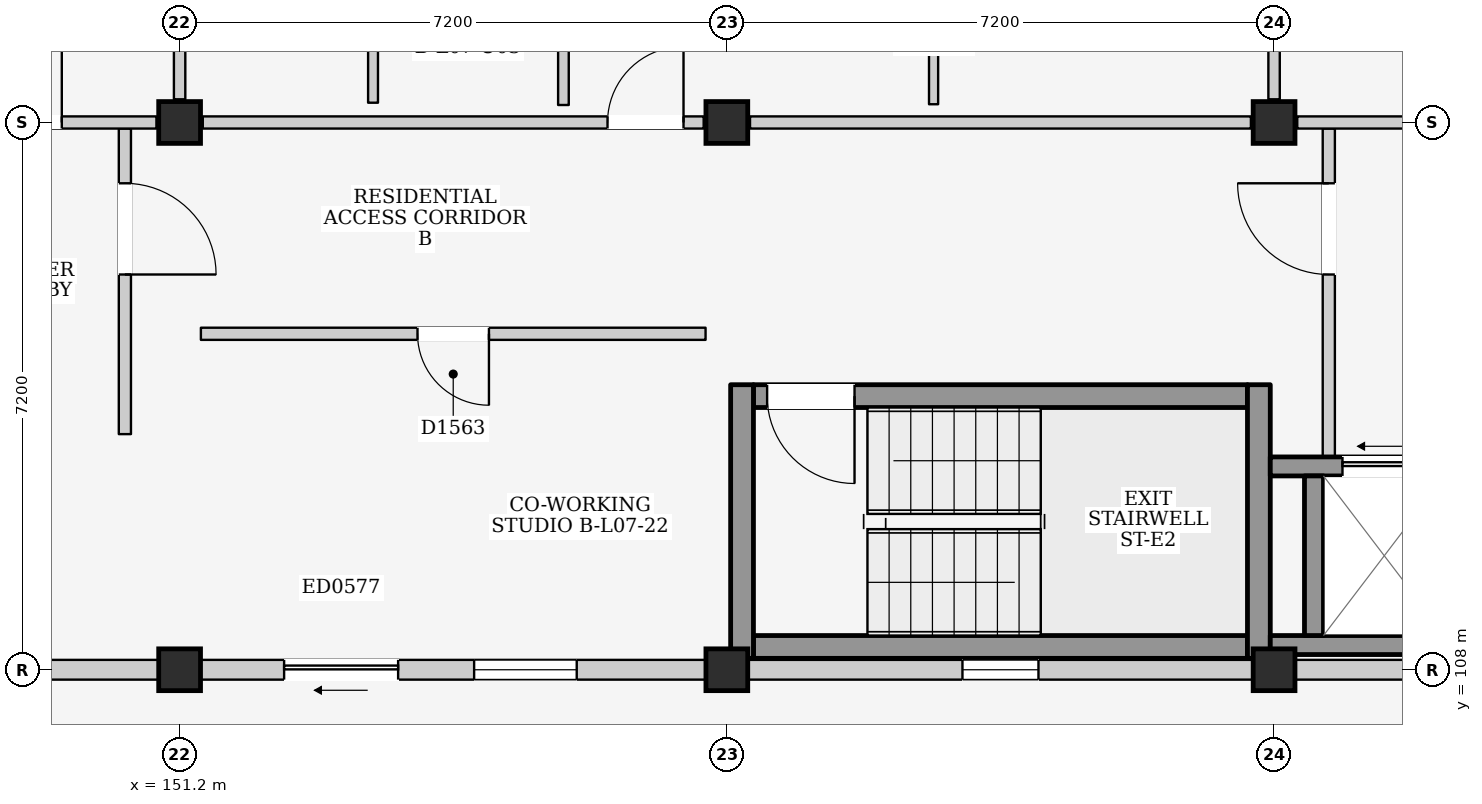
"""IFC4 building model, lengths in metres.
Left out: names, types, materials, properties, quantities, classifications, styles, units other than length and angle.
Written with IfcOpenShell. Run it as: python <this file> out.ifc"""

import sys

from ifc_helpers import new_model, si_unit, direction, frame, frame_2d, origin, origin_2d, place, context, subcontext, project, spatial, rectangle, extrude, element, fill, save


model = new_model("IFC4")
c1 = context("Model", 3, precision=1e-05, world=origin(), true_north=direction((0.0, 1.0)))
c2 = subcontext(c1, "Body", "Model", "MODEL_VIEW")
j1 = project(units=[si_unit("LENGTHUNIT", "METRE"), si_unit("PLANEANGLEUNIT", "RADIAN")], contexts=[c1])
p1 = place(None, origin())
s1 = spatial("IfcSite", under=j1, at=p1, CompositionType="ELEMENT")
p2 = place(p1, origin())
s2 = spatial("IfcBuilding", under=s1, at=p2, CompositionType="ELEMENT")
p3 = place(p2, frame((0.0, 0.0, 25.1)))
s3 = spatial("IfcBuildingStorey", under=s2, at=p3, CompositionType="ELEMENT", Elevation=25.1)
for number, where, z_axis, x_axis in (
    (1, (151.2, 108.0, 0.0), (0.0, 0.0, 1.0), (1.0, 0.0, 0.0)),
    (2, (151.2, 115.2, 0.0), (0.0, 0.0, 1.0), (1.0, 0.0, 0.0)),
    (3, (158.4, 108.0, 0.0), (0.0, 0.0, 1.0), (1.0, 0.0, 0.0)),
    (4, (158.4, 115.2, 0.0), (0.0, 0.0, 1.0), (1.0, 0.0, 0.0)),
    (5, (165.6, 108.0, 0.0), (0.0, 0.0, 1.0), (1.0, 0.0, 0.0)),
    (6, (165.6, 115.2, 0.0), (0.0, 0.0, 1.0), (1.0, 0.0, 0.0)),
):
    element("IfcColumn", number, at=place(p3, frame(where, z_axis=z_axis, x_axis=x_axis)), inside=s3, PredefinedType="COLUMN", context=c2, shape_type="SweptSolid", body=[
        extrude(rectangle(XDim=0.55, YDim=0.55, at=origin_2d()), origin(), (0.0, 0.0, 1.0), 3.2),
    ])
p4 = place(p3, frame((144.275, 108.0, 0.0), z_axis=(0.0, 0.0, 1.0), x_axis=(1.0, 0.0, 0.0)))
e7 = element("IfcWall", 7, at=p4, inside=s3, PredefinedType="ELEMENTEDWALL", context=c2, shape_type="SweptSolid", body=[
    extrude(rectangle(XDim=6.65, YDim=0.26, at=frame_2d((3.325, 0.0))), origin(), (0.0, 0.0, 1.0), 2.375),
])
p5 = place(p4, frame((2.825, 0.0, 1.2)))
e8 = element("IfcOpeningElement", 8, at=p5, cuts=e7, PredefinedType="OPENING", context=c2, shape_type="SweptSolid", body=[
    extrude(rectangle(XDim=1.0, YDim=0.9, at=frame_2d((0.5, 0.45))), frame((0.0, 0.145, 0.0), z_axis=(0.0, -1.0, 0.0), x_axis=(1.0, 0.0, 0.0)), (0.0, 0.0, 1.0), 0.29),
])
p6 = place(p3, frame((151.475, 108.0, 0.0), z_axis=(0.0, 0.0, 1.0), x_axis=(1.0, 0.0, 0.0)))
e9 = element("IfcWall", 9, at=p6, inside=s3, PredefinedType="ELEMENTEDWALL", context=c2, shape_type="SweptSolid", body=[
    extrude(rectangle(XDim=6.65, YDim=0.26, at=frame_2d((3.325, 0.0))), origin(), (0.0, 0.0, 1.0), 2.375),
])
p7 = place(p6, frame((1.1, 0.0, 0.0)))
e10 = element("IfcOpeningElement", 10, at=p7, cuts=e9, PredefinedType="OPENING", context=c2, shape_type="SweptSolid", body=[
    extrude(rectangle(XDim=1.5, YDim=2.12, at=frame_2d((0.75, 1.06))), frame((0.0, 0.145, 0.0), z_axis=(0.0, -1.0, 0.0), x_axis=(1.0, 0.0, 0.0)), (0.0, 0.0, 1.0), 0.29),
])
p8 = place(p6, frame((3.6, 0.0, 0.765)))
e11 = element("IfcOpeningElement", 11, at=p8, cuts=e9, PredefinedType="OPENING", context=c2, shape_type="SweptSolid", body=[
    extrude(rectangle(XDim=1.35, YDim=1.5, at=frame_2d((0.675, 0.75))), frame((0.0, 0.145, 0.0), z_axis=(0.0, -1.0, 0.0), x_axis=(1.0, 0.0, 0.0)), (0.0, 0.0, 1.0), 0.29),
])
p9 = place(p3, frame((158.675, 108.0, 0.0), z_axis=(0.0, 0.0, 1.0), x_axis=(1.0, 0.0, 0.0)))
e12 = element("IfcWall", 12, at=p9, inside=s3, PredefinedType="ELEMENTEDWALL", context=c2, shape_type="SweptSolid", body=[
    extrude(rectangle(XDim=6.65, YDim=0.26, at=frame_2d((3.325, 0.0))), origin(), (0.0, 0.0, 1.0), 2.375),
])
p10 = place(p9, frame((2.825, 0.0, 1.2)))
e13 = element("IfcOpeningElement", 13, at=p10, cuts=e12, PredefinedType="OPENING", context=c2, shape_type="SweptSolid", body=[
    extrude(rectangle(XDim=1.0, YDim=0.9, at=frame_2d((0.5, 0.45))), frame((0.0, 0.145, 0.0), z_axis=(0.0, -1.0, 0.0), x_axis=(1.0, 0.0, 0.0)), (0.0, 0.0, 1.0), 0.29),
])
p11 = place(p3, frame((165.875, 108.0, 0.0), z_axis=(0.0, 0.0, 1.0), x_axis=(1.0, 0.0, 0.0)))
e14 = element("IfcWall", 14, at=p11, inside=s3, PredefinedType="ELEMENTEDWALL", context=c2, shape_type="SweptSolid", body=[
    extrude(rectangle(XDim=6.65, YDim=0.26, at=frame_2d((3.325, 0.0))), origin(), (0.0, 0.0, 1.0), 2.375),
])
p12 = place(p11, frame((2.825, 0.0, 1.2)))
e15 = element("IfcOpeningElement", 15, at=p12, cuts=e14, PredefinedType="OPENING", context=c2, shape_type="SweptSolid", body=[
    extrude(rectangle(XDim=1.0, YDim=0.9, at=frame_2d((0.5, 0.45))), frame((0.0, 0.145, 0.0), z_axis=(0.0, -1.0, 0.0), x_axis=(1.0, 0.0, 0.0)), (0.0, 0.0, 1.0), 0.29),
])
p13 = place(p3, frame((150.48, 111.1, 0.0), z_axis=(0.0, 0.0, 1.0), x_axis=(0.0, 1.0, 0.0)))
e16 = element("IfcWall", 16, at=p13, inside=s3, PredefinedType="PARTITIONING", context=c2, shape_type="SweptSolid", body=[
    extrude(rectangle(XDim=4.02, YDim=0.16, at=frame_2d((2.01, 0.0))), origin(), (0.0, 0.0, 1.0), 2.99),
])
p14 = place(p13, frame((2.1, 0.0, 0.0)))
e17 = element("IfcOpeningElement", 17, at=p14, cuts=e16, PredefinedType="OPENING", context=c2, shape_type="SweptSolid", body=[
    extrude(rectangle(XDim=1.2, YDim=2.2, at=frame_2d((0.6, 1.1))), frame((0.0, 0.095, 0.0), z_axis=(0.0, -1.0, 0.0), x_axis=(1.0, 0.0, 0.0)), (0.0, 0.0, 1.0), 0.19),
])
p15 = place(p3, frame((158.75, 108.3, 0.0), z_axis=(0.0, 0.0, 1.0), x_axis=(1.0, 0.0, 0.0)))
e18 = element("IfcWall", 18, at=p15, inside=s3, PredefinedType="SHEAR", context=c2, shape_type="SweptSolid", body=[
    extrude(rectangle(XDim=6.5, YDim=0.3, at=frame_2d((3.25, 0.0))), origin(), (0.0, 0.0, 1.0), 2.99),
])
p16 = place(p3, frame((158.75, 111.6, 0.0), z_axis=(0.0, 0.0, 1.0), x_axis=(1.0, 0.0, 0.0)))
e19 = element("IfcWall", 19, at=p16, inside=s3, PredefinedType="SHEAR", context=c2, shape_type="SweptSolid", body=[
    extrude(rectangle(XDim=6.5, YDim=0.3, at=frame_2d((3.25, 0.0))), origin(), (0.0, 0.0, 1.0), 2.99),
])
p17 = place(p16, frame((0.18, 0.0, 0.0)))
e20 = element("IfcOpeningElement", 20, at=p17, cuts=e19, PredefinedType="OPENING", context=c2, shape_type="SweptSolid", body=[
    extrude(rectangle(XDim=1.15, YDim=2.2, at=frame_2d((0.575, 1.1))), frame((0.0, 0.165, 0.0), z_axis=(0.0, -1.0, 0.0), x_axis=(1.0, 0.0, 0.0)), (0.0, 0.0, 1.0), 0.33),
])
for number, where, z_axis, x_axis in (
    (21, (158.6, 108.15, 0.0), (0.0, 0.0, 1.0), (0.0, 1.0, 0.0)),
    (22, (165.4, 108.15, 0.0), (0.0, 0.0, 1.0), (0.0, 1.0, 0.0)),
):
    element("IfcWall", number, at=place(p3, frame(where, z_axis=z_axis, x_axis=x_axis)), inside=s3, PredefinedType="SHEAR", context=c2, shape_type="SweptSolid", body=[
        extrude(rectangle(XDim=3.6, YDim=0.3, at=frame_2d((1.8, 0.0))), origin(), (0.0, 0.0, 1.0), 2.99),
    ])
p18 = place(p3, frame((166.32, 110.8, 0.0), z_axis=(0.0, 0.0, 1.0), x_axis=(0.0, 1.0, 0.0)))
e23 = element("IfcWall", 23, at=p18, inside=s3, PredefinedType="PARTITIONING", context=c2, shape_type="SweptSolid", body=[
    extrude(rectangle(XDim=4.32, YDim=0.16, at=frame_2d((2.16, 0.0))), origin(), (0.0, 0.0, 1.0), 2.99),
])
p19 = place(p18, frame((2.4, 0.0, 0.0)))
e24 = element("IfcOpeningElement", 24, at=p19, cuts=e23, PredefinedType="OPENING", context=c2, shape_type="SweptSolid", body=[
    extrude(rectangle(XDim=1.2, YDim=2.2, at=frame_2d((0.6, 1.1))), frame((0.0, 0.095, 0.0), z_axis=(0.0, -1.0, 0.0), x_axis=(1.0, 0.0, 0.0)), (0.0, 0.0, 1.0), 0.19),
])
p20 = place(p3, frame((165.55, 108.325, 0.0), z_axis=(0.0, 0.0, 1.0), x_axis=(1.0, 0.0, 0.0)))
e25 = element("IfcWall", 25, at=p20, inside=s3, PredefinedType="SHEAR", context=c2, shape_type="SweptSolid", body=[
    extrude(rectangle(XDim=2.55, YDim=0.25, at=frame_2d((1.275, 0.0))), origin(), (0.0, 0.0, 1.0), 2.99),
])
p21 = place(p3, frame((165.55, 110.675, 0.0), z_axis=(0.0, 0.0, 1.0), x_axis=(1.0, 0.0, 0.0)))
e26 = element("IfcWall", 26, at=p21, inside=s3, PredefinedType="SHEAR", context=c2, shape_type="SweptSolid", body=[
    extrude(rectangle(XDim=2.55, YDim=0.25, at=frame_2d((1.275, 0.0))), origin(), (0.0, 0.0, 1.0), 2.99),
])
p22 = place(p21, frame((0.95, 0.0, 0.0)))
e27 = element("IfcOpeningElement", 27, at=p22, cuts=e26, PredefinedType="OPENING", context=c2, shape_type="SweptSolid", body=[
    extrude(rectangle(XDim=1.1, YDim=2.15, at=frame_2d((0.55, 1.075))), frame((0.0, 0.14, 0.0), z_axis=(0.0, -1.0, 0.0), x_axis=(1.0, 0.0, 0.0)), (0.0, 0.0, 1.0), 0.28),
])
p23 = place(p3, frame((166.125, 108.45, 0.0), z_axis=(0.0, 0.0, 1.0), x_axis=(0.0, 1.0, 0.0)))
e28 = element("IfcWall", 28, at=p23, inside=s3, PredefinedType="SHEAR", context=c2, shape_type="SweptSolid", body=[
    extrude(rectangle(XDim=2.1, YDim=0.25, at=frame_2d((1.05, 0.0))), origin(), (0.0, 0.0, 1.0), 2.99),
])
p24 = place(p3, frame((144.305, 115.2, 0.0), z_axis=(0.0, 0.0, 1.0), x_axis=(1.0, 0.0, 0.0)))
e29 = element("IfcWall", 29, at=p24, inside=s3, PredefinedType="PARTITIONING", context=c2, shape_type="SweptSolid", body=[
    extrude(rectangle(XDim=6.59, YDim=0.16, at=frame_2d((3.295, 0.0))), origin(), (0.0, 0.0, 1.0), 2.375),
])
p25 = place(p24, frame((4.345, 0.0, 0.0)))
e30 = element("IfcOpeningElement", 30, at=p25, cuts=e29, PredefinedType="OPENING", context=c2, shape_type="SweptSolid", body=[
    extrude(rectangle(XDim=1.0, YDim=2.15, at=frame_2d((0.5, 1.075))), frame((0.0, 0.095, 0.0), z_axis=(0.0, -1.0, 0.0), x_axis=(1.0, 0.0, 0.0)), (0.0, 0.0, 1.0), 0.19),
])
p26 = place(p3, frame((151.2, 115.505, 0.0), z_axis=(0.0, 0.0, 1.0), x_axis=(0.0, 1.0, 0.0)))
e31 = element("IfcWall", 31, at=p26, inside=s3, PredefinedType="PARTITIONING", context=c2, shape_type="SweptSolid", body=[
    extrude(rectangle(XDim=6.59, YDim=0.15, at=frame_2d((3.295, 0.0))), origin(), (0.0, 0.0, 1.0), 2.475),
])
p27 = place(p3, frame((151.505, 115.2, 0.0), z_axis=(0.0, 0.0, 1.0), x_axis=(1.0, 0.0, 0.0)))
e32 = element("IfcWall", 32, at=p27, inside=s3, PredefinedType="PARTITIONING", context=c2, shape_type="SweptSolid", body=[
    extrude(rectangle(XDim=6.59, YDim=0.16, at=frame_2d((3.295, 0.0))), origin(), (0.0, 0.0, 1.0), 2.375),
])
p28 = place(p27, frame((5.325, 0.0, 0.0)))
e33 = element("IfcOpeningElement", 33, at=p28, cuts=e32, PredefinedType="OPENING", context=c2, shape_type="SweptSolid", body=[
    extrude(rectangle(XDim=1.0, YDim=2.15, at=frame_2d((0.5, 1.075))), frame((0.0, 0.095, 0.0), z_axis=(0.0, -1.0, 0.0), x_axis=(1.0, 0.0, 0.0)), (0.0, 0.0, 1.0), 0.19),
])
p29 = place(p3, frame((158.705, 115.2, 0.0), z_axis=(0.0, 0.0, 1.0), x_axis=(1.0, 0.0, 0.0)))
e34 = element("IfcWall", 34, at=p29, inside=s3, PredefinedType="PARTITIONING", context=c2, shape_type="SweptSolid", body=[
    extrude(rectangle(XDim=6.59, YDim=0.16, at=frame_2d((3.295, 0.0))), origin(), (0.0, 0.0, 1.0), 2.375),
])
p30 = place(p3, frame((165.6, 115.505, 0.0), z_axis=(0.0, 0.0, 1.0), x_axis=(0.0, 1.0, 0.0)))
e35 = element("IfcWall", 35, at=p30, inside=s3, PredefinedType="PARTITIONING", context=c2, shape_type="SweptSolid", body=[
    extrude(rectangle(XDim=6.59, YDim=0.15, at=frame_2d((3.295, 0.0))), origin(), (0.0, 0.0, 1.0), 2.475),
])
p31 = place(p3, frame((153.745, 115.46, 0.0), z_axis=(0.0, 0.0, 1.0), x_axis=(0.0, 1.0, 0.0)))
e36 = element("IfcWall", 36, at=p31, inside=s3, PredefinedType="PARTITIONING", context=c2, shape_type="SweptSolid", body=[
    extrude(rectangle(XDim=3.04, YDim=0.13, at=frame_2d((1.52, 0.0))), origin(), (0.0, 0.0, 1.0), 2.99),
])
p32 = place(p3, frame((156.25, 115.43, 0.0), z_axis=(0.0, 0.0, 1.0), x_axis=(0.0, 1.0, 0.0)))
e37 = element("IfcWall", 37, at=p32, inside=s3, PredefinedType="PARTITIONING", context=c2, shape_type="SweptSolid", body=[
    extrude(rectangle(XDim=3.06, YDim=0.14, at=frame_2d((1.53, 0.0))), origin(), (0.0, 0.0, 1.0), 2.99),
])
p33 = place(p3, frame((161.12, 115.44, 0.0), z_axis=(0.0, 0.0, 1.0), x_axis=(0.0, 1.0, 0.0)))
e38 = element("IfcWall", 38, at=p33, inside=s3, PredefinedType="PARTITIONING", context=c2, shape_type="SweptSolid", body=[
    extrude(rectangle(XDim=3.04, YDim=0.12, at=frame_2d((1.52, 0.0))), origin(), (0.0, 0.0, 1.0), 2.99),
])
p34 = place(p33, frame((1.04, 0.0, 0.0)))
e39 = element("IfcOpeningElement", 39, at=p34, cuts=e38, PredefinedType="OPENING", context=c2, shape_type="SweptSolid", body=[
    extrude(rectangle(XDim=0.96, YDim=2.15, at=frame_2d((0.48, 1.075))), frame((0.0, 0.075, 0.0), z_axis=(0.0, -1.0, 0.0), x_axis=(1.0, 0.0, 0.0)), (0.0, 0.0, 1.0), 0.15),
])
p35 = place(p3, frame((165.905, 115.2, 0.0), z_axis=(0.0, 0.0, 1.0), x_axis=(1.0, 0.0, 0.0)))
e40 = element("IfcWall", 40, at=p35, inside=s3, PredefinedType="PARTITIONING", context=c2, shape_type="SweptSolid", body=[
    extrude(rectangle(XDim=6.59, YDim=0.16, at=frame_2d((3.295, 0.0))), origin(), (0.0, 0.0, 1.0), 2.375),
])
p36 = place(p35, frame((4.345, 0.0, 0.0)))
e41 = element("IfcOpeningElement", 41, at=p36, cuts=e40, PredefinedType="OPENING", context=c2, shape_type="SweptSolid", body=[
    extrude(rectangle(XDim=1.0, YDim=2.15, at=frame_2d((0.5, 1.075))), frame((0.0, 0.095, 0.0), z_axis=(0.0, -1.0, 0.0), x_axis=(1.0, 0.0, 0.0)), (0.0, 0.0, 1.0), 0.19),
])
p37 = place(p3, frame((151.48, 112.42, 0.0), z_axis=(0.0, 0.0, 1.0), x_axis=(1.0, 0.0, 0.0)))
e42 = element("IfcWall", 42, at=p37, inside=s3, PredefinedType="PARTITIONING", context=c2, shape_type="SweptSolid", body=[
    extrude(rectangle(XDim=6.64, YDim=0.16, at=frame_2d((3.32, 0.0))), origin(), (0.0, 0.0, 1.0), 2.99),
])
p38 = place(p37, frame((2.85, 0.0, 0.0)))
e43 = element("IfcOpeningElement", 43, at=p38, cuts=e42, PredefinedType="OPENING", context=c2, shape_type="SweptSolid", body=[
    extrude(rectangle(XDim=0.94, YDim=2.12, at=frame_2d((0.47, 1.06))), frame((0.0, 0.095, 0.0), z_axis=(0.0, -1.0, 0.0), x_axis=(1.0, 0.0, 0.0)), (0.0, 0.0, 1.0), 0.19),
])
p39 = place(p7, frame((1.5, 0.0, 0.0), z_axis=(0.0, 0.0, 1.0), x_axis=(-1.0, 0.0, 0.0)))
e44 = element("IfcDoor", 44, at=p39, inside=s3, OperationType="SLIDING_TO_LEFT", PredefinedType="DOOR", context=c2, shape_type="SweptSolid", body=[
    extrude(rectangle(XDim=1.5, YDim=2.12, at=frame_2d((0.75, 1.06))), frame((0.0, 0.025, 0.0), z_axis=(0.0, -1.0, 0.0), x_axis=(1.0, 0.0, 0.0)), (0.0, 0.0, 1.0), 0.05),
])
fill(e10, e44)
p40 = place(p8, origin())
e45 = element("IfcWindow", 45, at=p40, inside=s3, PartitioningType="SINGLE_PANEL", PredefinedType="WINDOW", context=c2, shape_type="SweptSolid", body=[
    extrude(rectangle(XDim=1.35, YDim=1.5, at=frame_2d((0.675, 0.75))), frame((0.0, 0.03, 0.0), z_axis=(0.0, -1.0, 0.0), x_axis=(1.0, 0.0, 0.0)), (0.0, 0.0, 1.0), 0.06),
])
fill(e11, e45)
p41 = place(p10, origin())
e46 = element("IfcWindow", 46, at=p41, inside=s3, PartitioningType="SINGLE_PANEL", PredefinedType="WINDOW", context=c2, shape_type="SweptSolid", body=[
    extrude(rectangle(XDim=1.0, YDim=0.9, at=frame_2d((0.5, 0.45))), frame((0.0, 0.03, 0.0), z_axis=(0.0, -1.0, 0.0), x_axis=(1.0, 0.0, 0.0)), (0.0, 0.0, 1.0), 0.06),
])
fill(e13, e46)
p42 = place(p14, frame((1.2, 0.0, 0.0), z_axis=(0.0, 0.0, 1.0), x_axis=(-1.0, 0.0, 0.0)))
e47 = element("IfcDoor", 47, at=p42, inside=s3, OperationType="SINGLE_SWING_RIGHT", PredefinedType="DOOR", context=c2, shape_type="SweptSolid", body=[
    extrude(rectangle(XDim=1.2, YDim=2.2, at=frame_2d((0.6, 1.1))), frame((0.0, 0.025, 0.0), z_axis=(0.0, -1.0, 0.0), x_axis=(1.0, 0.0, 0.0)), (0.0, 0.0, 1.0), 0.05),
])
fill(e17, e47)
p43 = place(p17, frame((1.15, 0.0, 0.0), z_axis=(0.0, 0.0, 1.0), x_axis=(-1.0, 0.0, 0.0)))
e48 = element("IfcDoor", 48, at=p43, inside=s3, OperationType="SINGLE_SWING_LEFT", PredefinedType="DOOR", context=c2, shape_type="SweptSolid", body=[
    extrude(rectangle(XDim=1.15, YDim=2.2, at=frame_2d((0.575, 1.1))), frame((0.0, 0.025, 0.0), z_axis=(0.0, -1.0, 0.0), x_axis=(1.0, 0.0, 0.0)), (0.0, 0.0, 1.0), 0.05),
])
fill(e20, e48)
p44 = place(p19, origin())
e49 = element("IfcDoor", 49, at=p44, inside=s3, OperationType="SINGLE_SWING_RIGHT", PredefinedType="DOOR", context=c2, shape_type="SweptSolid", body=[
    extrude(rectangle(XDim=1.2, YDim=2.2, at=frame_2d((0.6, 1.1))), frame((0.0, 0.025, 0.0), z_axis=(0.0, -1.0, 0.0), x_axis=(1.0, 0.0, 0.0)), (0.0, 0.0, 1.0), 0.05),
])
fill(e24, e49)
p45 = place(p22, origin())
e50 = element("IfcDoor", 50, at=p45, inside=s3, OperationType="SLIDING_TO_LEFT", PredefinedType="DOOR", context=c2, shape_type="SweptSolid", body=[
    extrude(rectangle(XDim=1.1, YDim=2.15, at=frame_2d((0.55, 1.075))), frame((0.0, 0.025, 0.0), z_axis=(0.0, -1.0, 0.0), x_axis=(1.0, 0.0, 0.0)), (0.0, 0.0, 1.0), 0.05),
])
fill(e27, e50)
p46 = place(p25, origin())
e51 = element("IfcDoor", 51, at=p46, inside=s3, OperationType="SINGLE_SWING_RIGHT", PredefinedType="DOOR", context=c2, shape_type="SweptSolid", body=[
    extrude(rectangle(XDim=1.0, YDim=2.15, at=frame_2d((0.5, 1.075))), frame((0.0, 0.025, 0.0), z_axis=(0.0, -1.0, 0.0), x_axis=(1.0, 0.0, 0.0)), (0.0, 0.0, 1.0), 0.05),
])
fill(e30, e51)
p47 = place(p28, origin())
e52 = element("IfcDoor", 52, at=p47, inside=s3, OperationType="SINGLE_SWING_RIGHT", PredefinedType="DOOR", context=c2, shape_type="SweptSolid", body=[
    extrude(rectangle(XDim=1.0, YDim=2.15, at=frame_2d((0.5, 1.075))), frame((0.0, 0.025, 0.0), z_axis=(0.0, -1.0, 0.0), x_axis=(1.0, 0.0, 0.0)), (0.0, 0.0, 1.0), 0.05),
])
fill(e33, e52)
p48 = place(p38, frame((0.94, 0.0, 0.0), z_axis=(0.0, 0.0, 1.0), x_axis=(-1.0, 0.0, 0.0)))
e53 = element("IfcDoor", 53, at=p48, inside=s3, OperationType="SINGLE_SWING_LEFT", PredefinedType="DOOR", context=c2, shape_type="SweptSolid", body=[
    extrude(rectangle(XDim=0.94, YDim=2.12, at=frame_2d((0.47, 1.06))), frame((0.0, 0.025, 0.0), z_axis=(0.0, -1.0, 0.0), x_axis=(1.0, 0.0, 0.0)), (0.0, 0.0, 1.0), 0.05),
])
fill(e43, e53)
save(model, sys.argv[1])
